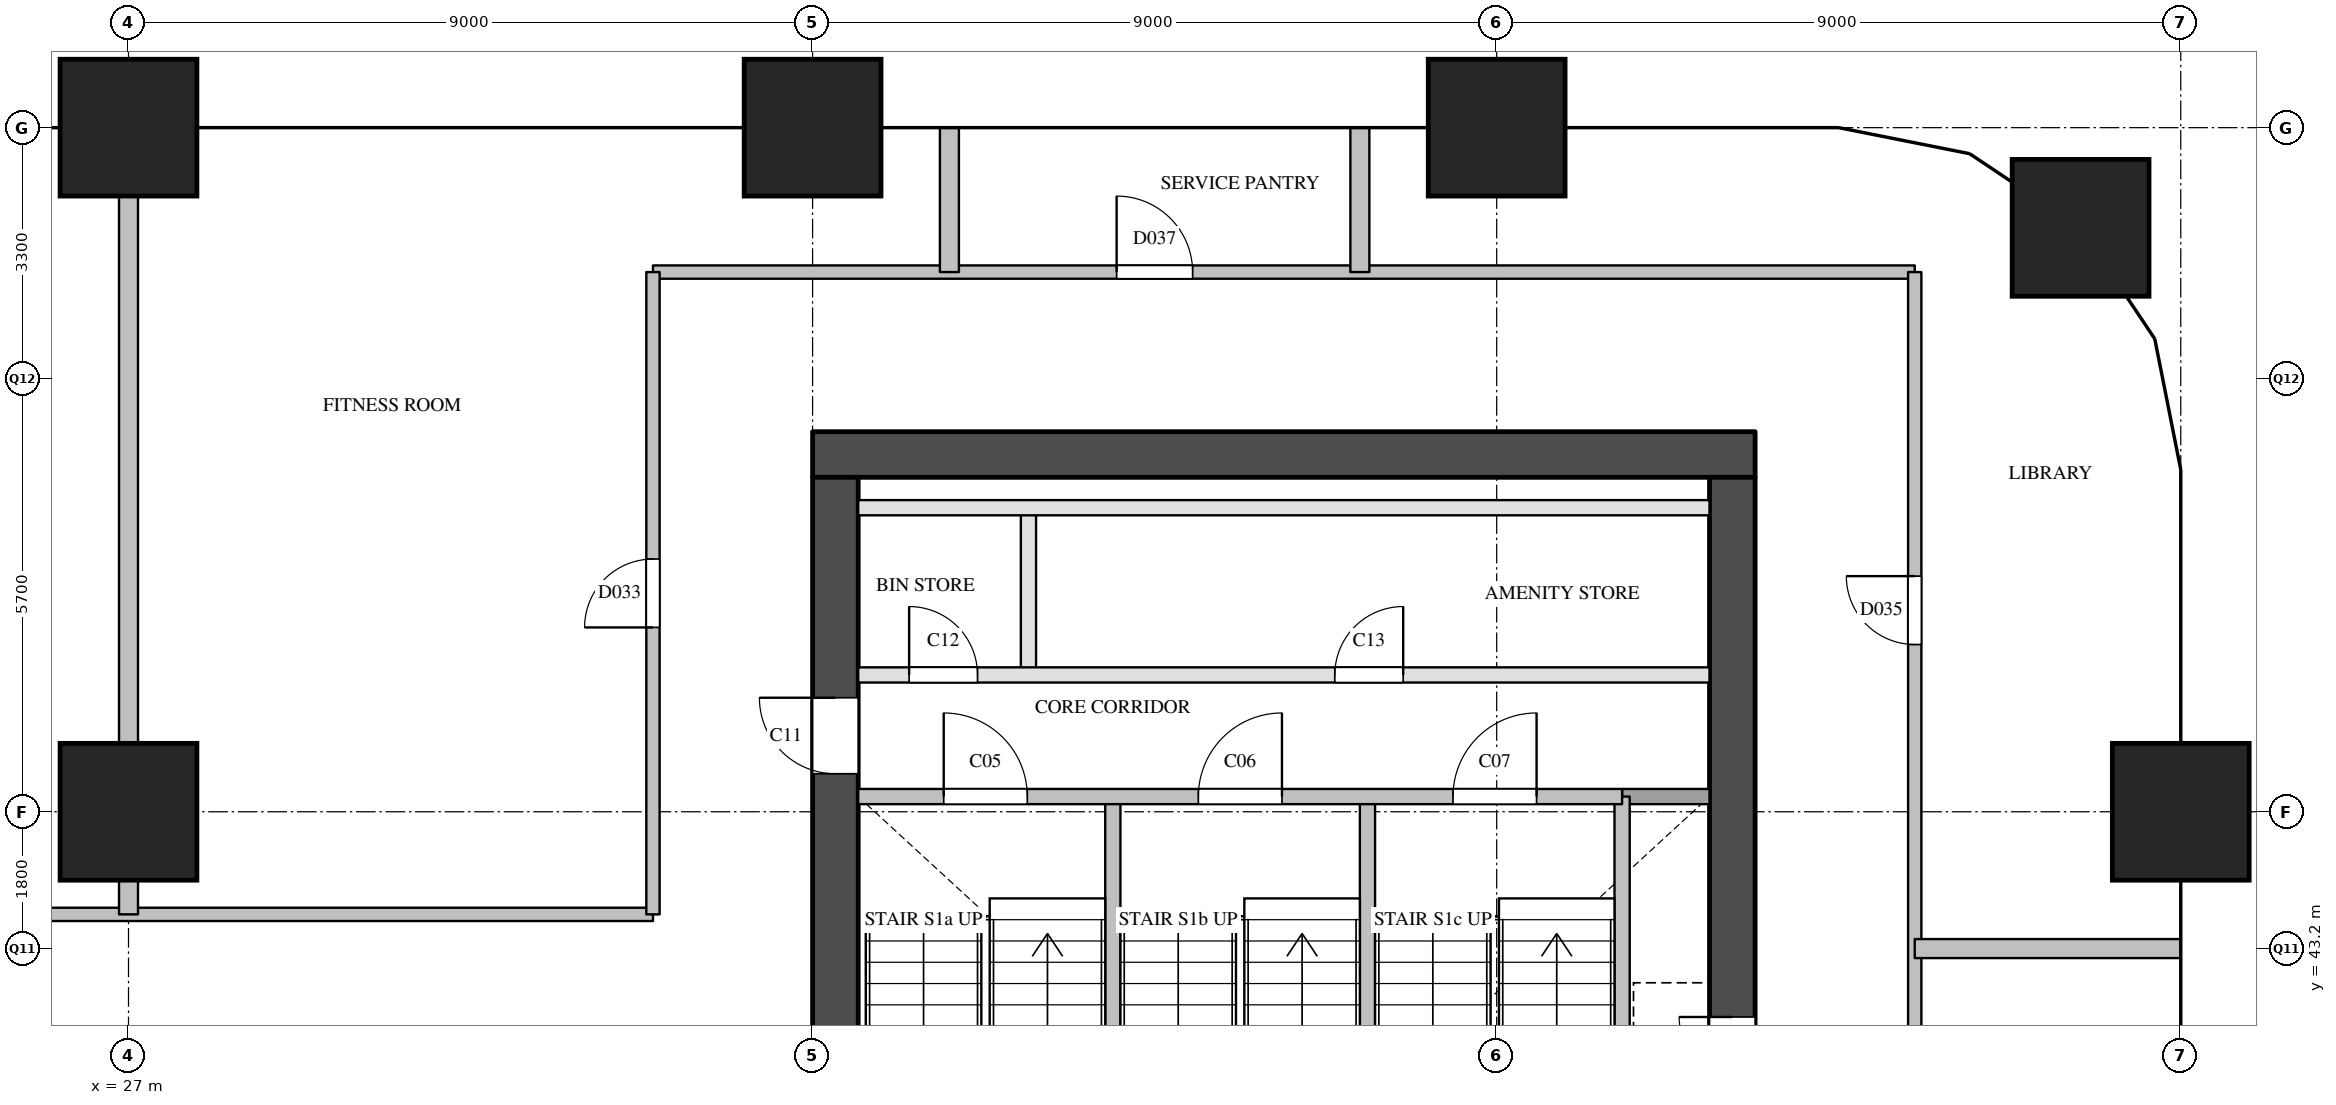
"""IFC4 building model, lengths in metres.
Left out: names, types, materials, properties, quantities, classifications, styles, units other than length and angle.
Written with IfcOpenShell. Run it as: python <this file> out.ifc"""

import sys

from ifc_helpers import new_model, si_unit, direction, frame, frame_2d, origin, origin_2d, place, context, subcontext, project, spatial, rectangle, extrude, element, fill, save


model = new_model("IFC4")
c1 = context("Model", 3, precision=1e-05, world=origin(), true_north=direction((0.0, 1.0)))
c2 = subcontext(c1, "Body", "Model", "MODEL_VIEW")
j1 = project(units=[si_unit("LENGTHUNIT", "METRE"), si_unit("PLANEANGLEUNIT", "RADIAN")], contexts=[c1])
p1 = place(None, origin())
s1 = spatial("IfcSite", under=j1, at=p1, CompositionType="ELEMENT")
p2 = place(p1, origin())
s2 = spatial("IfcBuilding", under=s1, at=p2, CompositionType="ELEMENT")
p3 = place(p2, frame((0.0, 0.0, 53.8)))
s3 = spatial("IfcBuildingStorey", under=s2, at=p3, CompositionType="ELEMENT", Elevation=53.8)
for number, where, z_axis, x_axis in (
    (1, (27.0, 45.0, 0.0), (0.0, 0.0, 1.0), (1.0, 0.0, 0.0)),
    (2, (27.0, 54.0, 0.0), (0.0, 0.0, 1.0), (1.0, 0.0, 0.0)),
    (3, (36.0, 54.0, 0.0), (0.0, 0.0, 1.0), (1.0, 0.0, 0.0)),
    (4, (45.0, 54.0, 0.0), (0.0, 0.0, 1.0), (1.0, 0.0, 0.0)),
    (5, (54.0, 45.0, 0.0), (0.0, 0.0, 1.0), (1.0, 0.0, 0.0)),
    (6, (52.682, 52.682, 0.0), (0.0, 0.0, 1.0), (1.0, 0.0, 0.0)),
):
    element("IfcColumn", number, at=place(p3, frame(where, z_axis=z_axis, x_axis=x_axis)), inside=s3, PredefinedType="COLUMN", context=c2, shape_type="SweptSolid", body=[
        extrude(rectangle(XDim=1.8, YDim=1.8, at=origin_2d()), origin(), (0.0, 0.0, 1.0), 3.8),
    ])
p4 = place(p3, frame((36.0, 49.7, 0.0), z_axis=(0.0, 0.0, 1.0), x_axis=(1.0, 0.0, 0.0)))
e7 = element("IfcWall", 7, at=p4, inside=s3, PredefinedType="SHEAR", context=c2, shape_type="SweptSolid", body=[
    extrude(rectangle(XDim=12.4, YDim=0.6, at=frame_2d((6.2, 0.0))), origin(), (0.0, 0.0, 1.0), 3.5),
])
p5 = place(p3, frame((36.3, 29.1, 0.0), z_axis=(0.0, 0.0, 1.0), x_axis=(0.0, 1.0, 0.0)))
e8 = element("IfcWall", 8, at=p5, inside=s3, PredefinedType="SHEAR", context=c2, shape_type="SweptSolid", body=[
    extrude(rectangle(XDim=20.3, YDim=0.6, at=frame_2d((10.15, 0.0))), origin(), (0.0, 0.0, 1.0), 3.5),
])
p6 = place(p5, frame((3.6, 0.0, 0.0)))
e9 = element("IfcOpeningElement", 9, at=p6, cuts=e8, PredefinedType="OPENING", context=c2, shape_type="SweptSolid", body=[
    extrude(rectangle(XDim=1.8, YDim=2.1, at=frame_2d((0.9, 1.05))), frame((0.0, 0.31, 0.0), z_axis=(0.0, -1.0, 0.0), x_axis=(1.0, 0.0, 0.0)), (0.0, 0.0, 1.0), 0.62),
])
p7 = place(p5, frame((16.4, 0.0, 0.0)))
e10 = element("IfcOpeningElement", 10, at=p7, cuts=e8, PredefinedType="OPENING", context=c2, shape_type="SweptSolid", body=[
    extrude(rectangle(XDim=1.0, YDim=2.1, at=frame_2d((0.5, 1.05))), frame((0.0, 0.31, 0.0), z_axis=(0.0, -1.0, 0.0), x_axis=(1.0, 0.0, 0.0)), (0.0, 0.0, 1.0), 0.62),
])
p8 = place(p3, frame((48.1, 29.1, 0.0), z_axis=(0.0, 0.0, 1.0), x_axis=(0.0, 1.0, 0.0)))
e11 = element("IfcWall", 11, at=p8, inside=s3, PredefinedType="SHEAR", context=c2, shape_type="SweptSolid", body=[
    extrude(rectangle(XDim=20.3, YDim=0.6, at=frame_2d((10.15, 0.0))), origin(), (0.0, 0.0, 1.0), 3.5),
])
p9 = place(p8, frame((12.5, 0.0, 0.0)))
e12 = element("IfcOpeningElement", 12, at=p9, cuts=e11, PredefinedType="OPENING", context=c2, shape_type="SweptSolid", body=[
    extrude(rectangle(XDim=0.7, YDim=2.1, at=frame_2d((0.35, 1.05))), frame((0.0, 0.31, 0.0), z_axis=(0.0, -1.0, 0.0), x_axis=(1.0, 0.0, 0.0)), (0.0, 0.0, 1.0), 0.62),
])
p10 = place(p8, frame((3.9, 0.0, 0.0)))
e13 = element("IfcOpeningElement", 13, at=p10, cuts=e11, PredefinedType="OPENING", context=c2, shape_type="SweptSolid", body=[
    extrude(rectangle(XDim=1.8, YDim=2.1, at=frame_2d((0.9, 1.05))), frame((0.0, 0.31, 0.0), z_axis=(0.0, -1.0, 0.0), x_axis=(1.0, 0.0, 0.0)), (0.0, 0.0, 1.0), 0.62),
])
p11 = place(p3, frame((38.84, 46.8, 0.0), z_axis=(0.0, 0.0, 1.0), x_axis=(0.0, 1.0, 0.0)))
e14 = element("IfcWall", 14, at=p11, inside=s3, PredefinedType="PARTITIONING", context=c2, shape_type="SweptSolid", body=[
    extrude(rectangle(XDim=2.2, YDim=0.2, at=frame_2d((1.1, 0.0))), origin(), (0.0, 0.0, 1.0), 3.5),
])
for number, where, z_axis, x_axis in (
    (15, (39.95, 40.78, 0.0), (0.0, 0.0, 1.0), (0.0, 1.0, 0.0)),
    (16, (43.3, 40.78, 0.0), (0.0, 0.0, 1.0), (0.0, 1.0, 0.0)),
    (17, (46.65, 40.78, 0.0), (0.0, 0.0, 1.0), (0.0, 1.0, 0.0)),
):
    element("IfcWall", number, at=place(p3, frame(where, z_axis=z_axis, x_axis=x_axis)), inside=s3, PredefinedType="SOLIDWALL", context=c2, shape_type="SweptSolid", body=[
        extrude(rectangle(XDim=4.42, YDim=0.2, at=frame_2d((2.21, 0.0))), origin(), (0.0, 0.0, 1.0), 3.5),
    ])
p12 = place(p3, frame((46.65, 45.2, 0.0), z_axis=(0.0, 0.0, 1.0), x_axis=(1.0, 0.0, 0.0)))
e18 = element("IfcWall", 18, at=p12, inside=s3, PredefinedType="SOLIDWALL", context=c2, shape_type="SweptSolid", body=[
    extrude(rectangle(XDim=1.15, YDim=0.2, at=frame_2d((0.575, 0.0))), origin(), (0.0, 0.0, 1.0), 3.5),
])
p13 = place(p3, frame((36.6, 45.2, 0.0), z_axis=(0.0, 0.0, 1.0), x_axis=(1.0, 0.0, 0.0)))
e19 = element("IfcWall", 19, at=p13, inside=s3, PredefinedType="SOLIDWALL", context=c2, shape_type="SweptSolid", body=[
    extrude(rectangle(XDim=10.05, YDim=0.2, at=frame_2d((5.025, 0.0))), origin(), (0.0, 0.0, 1.0), 3.5),
])
p14 = place(p13, frame((1.125, 0.0, 0.0)))
e20 = element("IfcOpeningElement", 20, at=p14, cuts=e19, PredefinedType="OPENING", context=c2, shape_type="SweptSolid", body=[
    extrude(rectangle(XDim=1.1, YDim=2.1, at=frame_2d((0.55, 1.05))), frame((0.0, 0.11, 0.0), z_axis=(0.0, -1.0, 0.0), x_axis=(1.0, 0.0, 0.0)), (0.0, 0.0, 1.0), 0.22),
])
p15 = place(p13, frame((4.475, 0.0, 0.0)))
e21 = element("IfcOpeningElement", 21, at=p15, cuts=e19, PredefinedType="OPENING", context=c2, shape_type="SweptSolid", body=[
    extrude(rectangle(XDim=1.1, YDim=2.1, at=frame_2d((0.55, 1.05))), frame((0.0, 0.11, 0.0), z_axis=(0.0, -1.0, 0.0), x_axis=(1.0, 0.0, 0.0)), (0.0, 0.0, 1.0), 0.22),
])
p16 = place(p13, frame((7.825, 0.0, 0.0)))
e22 = element("IfcOpeningElement", 22, at=p16, cuts=e19, PredefinedType="OPENING", context=c2, shape_type="SweptSolid", body=[
    extrude(rectangle(XDim=1.1, YDim=2.1, at=frame_2d((0.55, 1.05))), frame((0.0, 0.11, 0.0), z_axis=(0.0, -1.0, 0.0), x_axis=(1.0, 0.0, 0.0)), (0.0, 0.0, 1.0), 0.22),
])
p17 = place(p3, frame((36.6, 46.8, 0.0), z_axis=(0.0, 0.0, 1.0), x_axis=(1.0, 0.0, 0.0)))
e23 = element("IfcWall", 23, at=p17, inside=s3, PredefinedType="PARTITIONING", context=c2, shape_type="SweptSolid", body=[
    extrude(rectangle(XDim=11.2, YDim=0.2, at=frame_2d((5.6, 0.0))), origin(), (0.0, 0.0, 1.0), 3.5),
])
p18 = place(p17, frame((0.67, 0.0, 0.0)))
e24 = element("IfcOpeningElement", 24, at=p18, cuts=e23, PredefinedType="OPENING", context=c2, shape_type="SweptSolid", body=[
    extrude(rectangle(XDim=0.9, YDim=2.1, at=frame_2d((0.45, 1.05))), frame((0.0, 0.11, 0.0), z_axis=(0.0, -1.0, 0.0), x_axis=(1.0, 0.0, 0.0)), (0.0, 0.0, 1.0), 0.22),
])
p19 = place(p17, frame((6.27, 0.0, 0.0)))
e25 = element("IfcOpeningElement", 25, at=p19, cuts=e23, PredefinedType="OPENING", context=c2, shape_type="SweptSolid", body=[
    extrude(rectangle(XDim=0.9, YDim=2.1, at=frame_2d((0.45, 1.05))), frame((0.0, 0.11, 0.0), z_axis=(0.0, -1.0, 0.0), x_axis=(1.0, 0.0, 0.0)), (0.0, 0.0, 1.0), 0.22),
])
p20 = place(p3, frame((36.6, 49.0, 0.0), z_axis=(0.0, 0.0, 1.0), x_axis=(1.0, 0.0, 0.0)))
e26 = element("IfcWall", 26, at=p20, inside=s3, PredefinedType="PARTITIONING", context=c2, shape_type="SweptSolid", body=[
    extrude(rectangle(XDim=11.2, YDim=0.2, at=frame_2d((5.6, 0.0))), origin(), (0.0, 0.0, 1.0), 3.5),
])
p21 = place(p3, frame((20.1, 43.65, 0.0), z_axis=(0.0, 0.0, 1.0), x_axis=(1.0, 0.0, 0.0)))
e27 = element("IfcWall", 27, at=p21, inside=s3, PredefinedType="PARTITIONING", context=c2, shape_type="SweptSolid", body=[
    extrude(rectangle(XDim=13.8, YDim=0.175, at=frame_2d((6.9, 0.0))), origin(), (0.0, 0.0, 1.0), 2.5),
])
p22 = place(p3, frame((33.9, 52.1, 0.0), z_axis=(0.0, 0.0, 1.0), x_axis=(1.0, 0.0, 0.0)))
e28 = element("IfcWall", 28, at=p22, inside=s3, PredefinedType="PARTITIONING", context=c2, shape_type="SweptSolid", body=[
    extrude(rectangle(XDim=16.6, YDim=0.175, at=frame_2d((8.3, 0.0))), origin(), (0.0, 0.0, 1.0), 3.5),
])
p23 = place(p22, frame((6.1, 0.0, 0.0)))
e29 = element("IfcOpeningElement", 29, at=p23, cuts=e28, PredefinedType="OPENING", context=c2, shape_type="SweptSolid", body=[
    extrude(rectangle(XDim=1.0, YDim=2.1, at=frame_2d((0.5, 1.05))), frame((0.0, 0.097, 0.0), z_axis=(0.0, -1.0, 0.0), x_axis=(1.0, 0.0, 0.0)), (0.0, 0.0, 1.0), 0.195),
])
p24 = place(p3, frame((33.9, 43.65, 0.0), z_axis=(0.0, 0.0, 1.0), x_axis=(0.0, 1.0, 0.0)))
e30 = element("IfcWall", 30, at=p24, inside=s3, PredefinedType="PARTITIONING", context=c2, shape_type="SweptSolid", body=[
    extrude(rectangle(XDim=8.45, YDim=0.175, at=frame_2d((4.225, 0.0))), origin(), (0.0, 0.0, 1.0), 3.5),
])
p25 = place(p24, frame((3.775, 0.0, 0.0)))
e31 = element("IfcOpeningElement", 31, at=p25, cuts=e30, PredefinedType="OPENING", context=c2, shape_type="SweptSolid", body=[
    extrude(rectangle(XDim=0.9, YDim=2.1, at=frame_2d((0.45, 1.05))), frame((0.0, 0.097, 0.0), z_axis=(0.0, -1.0, 0.0), x_axis=(1.0, 0.0, 0.0)), (0.0, 0.0, 1.0), 0.195),
])
p26 = place(p3, frame((50.5, 26.4, 0.0), z_axis=(0.0, 0.0, 1.0), x_axis=(0.0, 1.0, 0.0)))
e32 = element("IfcWall", 32, at=p26, inside=s3, PredefinedType="PARTITIONING", context=c2, shape_type="SweptSolid", body=[
    extrude(rectangle(XDim=25.7, YDim=0.175, at=frame_2d((12.85, 0.0))), origin(), (0.0, 0.0, 1.0), 2.5),
])
p27 = place(p26, frame((2.8, 0.0, 0.0)))
e33 = element("IfcOpeningElement", 33, at=p27, cuts=e32, PredefinedType="OPENING", context=c2, shape_type="SweptSolid", body=[
    extrude(rectangle(XDim=1.0, YDim=2.1, at=frame_2d((0.5, 1.05))), frame((0.0, 0.097, 0.0), z_axis=(0.0, -1.0, 0.0), x_axis=(1.0, 0.0, 0.0)), (0.0, 0.0, 1.0), 0.195),
])
p28 = place(p26, frame((10.95, 0.0, 0.0)))
e34 = element("IfcOpeningElement", 34, at=p28, cuts=e32, PredefinedType="OPENING", context=c2, shape_type="SweptSolid", body=[
    extrude(rectangle(XDim=0.9, YDim=2.1, at=frame_2d((0.45, 1.05))), frame((0.0, 0.097, 0.0), z_axis=(0.0, -1.0, 0.0), x_axis=(1.0, 0.0, 0.0)), (0.0, 0.0, 1.0), 0.195),
])
p29 = place(p26, frame((20.8, 0.0, 0.0)))
e35 = element("IfcOpeningElement", 35, at=p29, cuts=e32, PredefinedType="OPENING", context=c2, shape_type="SweptSolid", body=[
    extrude(rectangle(XDim=0.9, YDim=2.1, at=frame_2d((0.45, 1.05))), frame((0.0, 0.097, 0.0), z_axis=(0.0, -1.0, 0.0), x_axis=(1.0, 0.0, 0.0)), (0.0, 0.0, 1.0), 0.195),
])
p30 = place(p3, frame((50.5, 43.2, 0.0), z_axis=(0.0, 0.0, 1.0), x_axis=(1.0, 0.0, 0.0)))
e36 = element("IfcWall", 36, at=p30, inside=s3, PredefinedType="PARTITIONING", context=c2, shape_type="SweptSolid", body=[
    extrude(rectangle(XDim=3.5, YDim=0.25, at=frame_2d((1.75, 0.0))), origin(), (0.0, 0.0, 1.0), 2.5),
])
p31 = place(p3, frame((27.0, 43.65, 0.0), z_axis=(0.0, 0.0, 1.0), x_axis=(0.0, 1.0, 0.0)))
e37 = element("IfcWall", 37, at=p31, inside=s3, PredefinedType="PARTITIONING", context=c2, shape_type="SweptSolid", body=[
    extrude(rectangle(XDim=10.35, YDim=0.25, at=frame_2d((5.175, 0.0))), origin(), (0.0, 0.0, 1.0), 2.5),
])
for number, where, z_axis, x_axis in (
    (38, (37.8, 52.1, 0.0), (0.0, 0.0, 1.0), (0.0, 1.0, 0.0)),
    (39, (43.2, 52.1, 0.0), (0.0, 0.0, 1.0), (0.0, 1.0, 0.0)),
):
    element("IfcWall", number, at=place(p3, frame(where, z_axis=z_axis, x_axis=x_axis)), inside=s3, PredefinedType="PARTITIONING", context=c2, shape_type="SweptSolid", body=[
        extrude(rectangle(XDim=1.9, YDim=0.25, at=frame_2d((0.95, 0.0))), origin(), (0.0, 0.0, 1.0), 2.5),
    ])
p32 = place(p14, origin())
e40 = element("IfcDoor", 40, at=p32, inside=s3, OperationType="SINGLE_SWING_LEFT", PredefinedType="DOOR", context=c2, shape_type="SweptSolid", body=[
    extrude(rectangle(XDim=1.1, YDim=2.1, at=frame_2d((0.55, 1.05))), frame((0.0, 0.025, 0.0), z_axis=(0.0, -1.0, 0.0), x_axis=(1.0, 0.0, 0.0)), (0.0, 0.0, 1.0), 0.05),
])
fill(e20, e40)
p33 = place(p15, origin())
e41 = element("IfcDoor", 41, at=p33, inside=s3, OperationType="SINGLE_SWING_RIGHT", PredefinedType="DOOR", context=c2, shape_type="SweptSolid", body=[
    extrude(rectangle(XDim=1.1, YDim=2.1, at=frame_2d((0.55, 1.05))), frame((0.0, 0.025, 0.0), z_axis=(0.0, -1.0, 0.0), x_axis=(1.0, 0.0, 0.0)), (0.0, 0.0, 1.0), 0.05),
])
fill(e21, e41)
p34 = place(p16, origin())
e42 = element("IfcDoor", 42, at=p34, inside=s3, OperationType="SINGLE_SWING_RIGHT", PredefinedType="DOOR", context=c2, shape_type="SweptSolid", body=[
    extrude(rectangle(XDim=1.1, YDim=2.1, at=frame_2d((0.55, 1.05))), frame((0.0, 0.025, 0.0), z_axis=(0.0, -1.0, 0.0), x_axis=(1.0, 0.0, 0.0)), (0.0, 0.0, 1.0), 0.05),
])
fill(e22, e42)
p35 = place(p9, origin())
e43 = element("IfcDoor", 43, at=p35, inside=s3, OperationType="SINGLE_SWING_RIGHT", PredefinedType="DOOR", context=c2, shape_type="SweptSolid", body=[
    extrude(rectangle(XDim=0.7, YDim=2.1, at=frame_2d((0.35, 1.05))), frame((0.0, 0.025, 0.0), z_axis=(0.0, -1.0, 0.0), x_axis=(1.0, 0.0, 0.0)), (0.0, 0.0, 1.0), 0.05),
])
fill(e12, e43)
p36 = place(p7, origin())
e44 = element("IfcDoor", 44, at=p36, inside=s3, OperationType="SINGLE_SWING_RIGHT", PredefinedType="DOOR", context=c2, shape_type="SweptSolid", body=[
    extrude(rectangle(XDim=1.0, YDim=2.1, at=frame_2d((0.5, 1.05))), frame((0.0, 0.025, 0.0), z_axis=(0.0, -1.0, 0.0), x_axis=(1.0, 0.0, 0.0)), (0.0, 0.0, 1.0), 0.05),
])
fill(e10, e44)
p37 = place(p18, origin())
e45 = element("IfcDoor", 45, at=p37, inside=s3, OperationType="SINGLE_SWING_LEFT", PredefinedType="DOOR", context=c2, shape_type="SweptSolid", body=[
    extrude(rectangle(XDim=0.9, YDim=2.1, at=frame_2d((0.45, 1.05))), frame((0.0, 0.025, 0.0), z_axis=(0.0, -1.0, 0.0), x_axis=(1.0, 0.0, 0.0)), (0.0, 0.0, 1.0), 0.05),
])
fill(e24, e45)
p38 = place(p19, origin())
e46 = element("IfcDoor", 46, at=p38, inside=s3, OperationType="SINGLE_SWING_RIGHT", PredefinedType="DOOR", context=c2, shape_type="SweptSolid", body=[
    extrude(rectangle(XDim=0.9, YDim=2.1, at=frame_2d((0.45, 1.05))), frame((0.0, 0.025, 0.0), z_axis=(0.0, -1.0, 0.0), x_axis=(1.0, 0.0, 0.0)), (0.0, 0.0, 1.0), 0.05),
])
fill(e25, e46)
p39 = place(p25, origin())
e47 = element("IfcDoor", 47, at=p39, inside=s3, OperationType="SINGLE_SWING_LEFT", PredefinedType="DOOR", context=c2, shape_type="SweptSolid", body=[
    extrude(rectangle(XDim=0.9, YDim=2.1, at=frame_2d((0.45, 1.05))), frame((0.0, 0.025, 0.0), z_axis=(0.0, -1.0, 0.0), x_axis=(1.0, 0.0, 0.0)), (0.0, 0.0, 1.0), 0.05),
])
fill(e31, e47)
p40 = place(p29, origin())
e48 = element("IfcDoor", 48, at=p40, inside=s3, OperationType="SINGLE_SWING_RIGHT", PredefinedType="DOOR", context=c2, shape_type="SweptSolid", body=[
    extrude(rectangle(XDim=0.9, YDim=2.1, at=frame_2d((0.45, 1.05))), frame((0.0, 0.025, 0.0), z_axis=(0.0, -1.0, 0.0), x_axis=(1.0, 0.0, 0.0)), (0.0, 0.0, 1.0), 0.05),
])
fill(e35, e48)
p41 = place(p23, origin())
e49 = element("IfcDoor", 49, at=p41, inside=s3, OperationType="SINGLE_SWING_LEFT", PredefinedType="DOOR", context=c2, shape_type="SweptSolid", body=[
    extrude(rectangle(XDim=1.0, YDim=2.1, at=frame_2d((0.5, 1.05))), frame((0.0, 0.025, 0.0), z_axis=(0.0, -1.0, 0.0), x_axis=(1.0, 0.0, 0.0)), (0.0, 0.0, 1.0), 0.05),
])
fill(e29, e49)
save(model, sys.argv[1])
